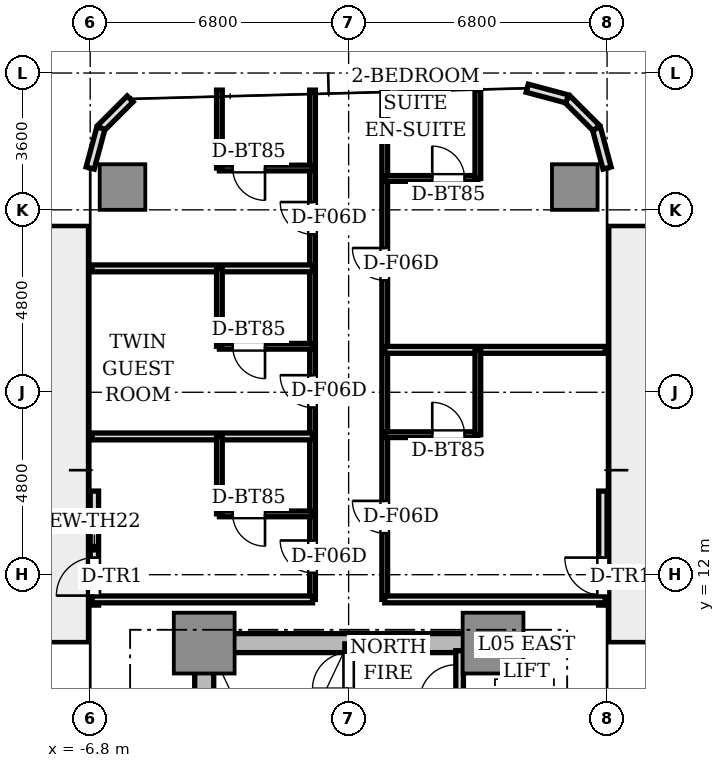
"""IFC4 building model, lengths in metres.
Left out: names, types, materials, properties, quantities, classifications, styles, units other than length and angle.
Written with IfcOpenShell. Run it as: python <this file> out.ifc"""

import sys

from ifc_helpers import new_model, si_unit, direction, frame, frame_2d, origin, origin_2d, place, context, subcontext, project, spatial, rectangle, extrude, source, transform, mapped, element, fill, save


model = new_model("IFC4")
c1 = context("Model", 3, precision=1e-05, world=origin(), true_north=direction((0.0, 1.0)))
c2 = subcontext(c1, "Body", "Model", "MODEL_VIEW")
j1 = project(units=[si_unit("LENGTHUNIT", "METRE"), si_unit("PLANEANGLEUNIT", "RADIAN")], contexts=[c1])
p1 = place(None, origin())
s1 = spatial("IfcSite", under=j1, at=p1, CompositionType="ELEMENT")
p2 = place(p1, origin())
s2 = spatial("IfcBuilding", under=s1, at=p2, CompositionType="ELEMENT")
p3 = place(p2, frame((0.0, 0.0, 23.1)))
s3 = spatial("IfcBuildingStorey", under=s2, at=p3, CompositionType="ELEMENT", Elevation=23.1)
p4 = place(p3, frame((-3.55, 10.2, 0.0), z_axis=(0.0, 0.0, 1.0), x_axis=(1.0, 0.0, 0.0)))
e1 = element("IfcWall", 1, at=p4, inside=s3, PredefinedType="SHEAR", context=c2, shape_type="SweptSolid", body=[
    extrude(rectangle(XDim=7.1, YDim=0.5, at=frame_2d((3.55, 0.0))), origin(), (0.0, 0.0, 1.0), 3.11),
])
p5 = place(p3, frame((-3.8, 2.85, 0.0), z_axis=(0.0, 0.0, 1.0), x_axis=(0.0, 1.0, 0.0)))
e2 = element("IfcWall", 2, at=p5, inside=s3, PredefinedType="SHEAR", context=c2, shape_type="SweptSolid", body=[
    extrude(rectangle(XDim=6.9, YDim=0.5, at=frame_2d((3.45, 0.0))), origin(), (0.0, 0.0, 1.0), 3.11),
])
m1 = source(origin(), c2, "Body", "SweptSolid", [
    extrude(rectangle(XDim=1.6, YDim=1.6, at=origin_2d()), origin(), (0.0, 0.0, 1.0), 3.11),
])
for number, where, z_axis, x_axis in (
    (3, (-3.8, 10.2, 0.0), (0.0, 0.0, 1.0), (1.0, 0.0, 0.0)),
    (4, (3.8, 10.2, 0.0), (0.0, 0.0, 1.0), (1.0, 0.0, 0.0)),
):
    element("IfcColumn", number, at=place(p3, frame(where, z_axis=z_axis, x_axis=x_axis)), inside=s3, PredefinedType="COLUMN", context=c2, shape_type="MappedRepresentation", body=[
        mapped(m1, transform((0.0, 0.0, 0.0), scale=1.0)),
    ])
m2 = source(origin(), c2, "Body", "SweptSolid", [
    extrude(rectangle(XDim=1.2, YDim=1.2, at=origin_2d()), origin(), (0.0, 0.0, 1.0), 3.11),
])
for number, where, z_axis, x_axis in (
    (5, (5.95, 22.2, 0.0), (0.0, 0.0, 1.0), (1.0, 0.0, 0.0)),
    (6, (-5.95, 22.2, 0.0), (0.0, 0.0, 1.0), (1.0, 0.0, 0.0)),
):
    element("IfcColumn", number, at=place(p3, frame(where, z_axis=z_axis, x_axis=x_axis)), inside=s3, PredefinedType="COLUMN", context=c2, shape_type="MappedRepresentation", body=[
        mapped(m2, transform((0.0, 0.0, 0.0), scale=1.0)),
    ])
p6 = place(p3, frame((-6.69, 11.2, 0.0), z_axis=(0.0, 0.0, 1.0), x_axis=(0.0, 1.0, 0.0)))
e7 = element("IfcWall", 7, at=p6, inside=s3, PredefinedType="STANDARD", context=c2, shape_type="SweptSolid", body=[
    extrude(rectangle(XDim=3.0, YDim=0.22, at=frame_2d((1.5, 0.0))), origin(), (0.0, 0.0, 1.0), 3.11),
])
p7 = place(p6, frame((0.25, 0.0, 0.0)))
e8 = element("IfcOpeningElement", 8, at=p7, cuts=e7, PredefinedType="OPENING", context=c2, shape_type="SweptSolid", body=[
    extrude(rectangle(XDim=1.0, YDim=2.2, at=frame_2d((0.5, 1.1))), frame((0.0, 0.12, 0.0), z_axis=(0.0, -1.0, 0.0), x_axis=(1.0, 0.0, 0.0)), (0.0, 0.0, 1.0), 0.24),
])
p8 = place(p3, frame((6.69, 11.2, 0.0), z_axis=(0.0, 0.0, 1.0), x_axis=(0.0, 1.0, 0.0)))
e9 = element("IfcWall", 9, at=p8, inside=s3, PredefinedType="STANDARD", context=c2, shape_type="SweptSolid", body=[
    extrude(rectangle(XDim=3.0, YDim=0.22, at=frame_2d((1.5, 0.0))), origin(), (0.0, 0.0, 1.0), 3.11),
])
p9 = place(p8, frame((0.25, 0.0, 0.0)))
e10 = element("IfcOpeningElement", 10, at=p9, cuts=e9, PredefinedType="OPENING", context=c2, shape_type="SweptSolid", body=[
    extrude(rectangle(XDim=1.0, YDim=2.2, at=frame_2d((0.5, 1.1))), frame((0.0, 0.12, 0.0), z_axis=(0.0, -1.0, 0.0), x_axis=(1.0, 0.0, 0.0)), (0.0, 0.0, 1.0), 0.24),
])
for number, where, z_axis, x_axis in (
    (11, (6.8, 22.7, 0.0), (0.0, 0.0, 1.0), (-0.259, 0.966, 0.0)),
    (12, (6.519, 23.75, 0.0), (0.0, 0.0, 1.0), (-0.707, 0.707, 0.0)),
    (13, (5.75, 24.519, 0.0), (0.0, 0.0, 1.0), (-0.966, 0.259, 0.0)),
    (14, (-5.75, 24.519, 0.0), (0.0, 0.0, 1.0), (-0.707, -0.707, 0.0)),
    (15, (-6.519, 23.75, 0.0), (0.0, 0.0, 1.0), (-0.259, -0.966, 0.0)),
):
    element("IfcWall", number, at=place(p3, frame(where, z_axis=z_axis, x_axis=x_axis)), inside=s3, PredefinedType="STANDARD", context=c2, shape_type="SweptSolid", body=[
        extrude(rectangle(XDim=1.087, YDim=0.22, at=frame_2d((0.543, 0.0))), origin(), (0.0, 0.0, 1.0), 3.11),
    ])
p10 = place(p3, frame((0.0, 2.5, 0.0), z_axis=(0.0, 0.0, 1.0), x_axis=(0.0, 1.0, 0.0)))
e16 = element("IfcWall", 16, at=p10, inside=s3, PredefinedType="SOLIDWALL", context=c2, shape_type="SweptSolid", body=[
    extrude(rectangle(XDim=7.68, YDim=0.2, at=frame_2d((3.84, 0.0))), origin(), (0.0, 0.0, 1.0), 3.11),
])
p11 = place(p10, frame((6.5, 0.0, 0.0)))
e17 = element("IfcOpeningElement", 17, at=p11, cuts=e16, PredefinedType="OPENING", context=c2, shape_type="SweptSolid", body=[
    extrude(rectangle(XDim=0.95, YDim=2.15, at=frame_2d((0.475, 1.075))), frame((0.0, 0.11, 0.0), z_axis=(0.0, -1.0, 0.0), x_axis=(1.0, 0.0, 0.0)), (0.0, 0.0, 1.0), 0.22),
])
p12 = place(p3, frame((2.92, 8.68, 0.0), z_axis=(0.0, 0.0, 1.0), x_axis=(0.0, 1.0, 0.0)))
e18 = element("IfcWall", 18, at=p12, inside=s3, PredefinedType="SOLIDWALL", context=c2, shape_type="SweptSolid", body=[
    extrude(rectangle(XDim=1.32, YDim=0.2, at=frame_2d((0.66, 0.0))), origin(), (0.0, 0.0, 1.0), 2.66),
])
p13 = place(p3, frame((-0.95, 11.35, 0.0), z_axis=(0.0, 0.0, 1.0), x_axis=(0.0, 1.0, 0.0)))
e19 = element("IfcWall", 19, at=p13, inside=s3, PredefinedType="PARTITIONING", context=c2, shape_type="SweptSolid", body=[
    extrude(rectangle(XDim=13.4, YDim=0.15, at=frame_2d((6.7, 0.0))), origin(), (0.0, 0.0, 1.0), 2.66),
])
p14 = place(p13, frame((0.7, 0.0, 0.0)))
e20 = element("IfcOpeningElement", 20, at=p14, cuts=e19, PredefinedType="OPENING", context=c2, shape_type="SweptSolid", body=[
    extrude(rectangle(XDim=0.85, YDim=2.1, at=frame_2d((0.425, 1.05))), frame((0.0, 0.085, 0.0), z_axis=(0.0, -1.0, 0.0), x_axis=(1.0, 0.0, 0.0)), (0.0, 0.0, 1.0), 0.17),
])
p15 = place(p13, frame((5.049, 0.0, 0.0)))
e21 = element("IfcOpeningElement", 21, at=p15, cuts=e19, PredefinedType="OPENING", context=c2, shape_type="SweptSolid", body=[
    extrude(rectangle(XDim=0.85, YDim=2.1, at=frame_2d((0.425, 1.05))), frame((0.0, 0.085, 0.0), z_axis=(0.0, -1.0, 0.0), x_axis=(1.0, 0.0, 0.0)), (0.0, 0.0, 1.0), 0.17),
])
p16 = place(p13, frame((9.605, 0.0, 0.0)))
e22 = element("IfcOpeningElement", 22, at=p16, cuts=e19, PredefinedType="OPENING", context=c2, shape_type="SweptSolid", body=[
    extrude(rectangle(XDim=0.85, YDim=2.1, at=frame_2d((0.425, 1.05))), frame((0.0, 0.085, 0.0), z_axis=(0.0, -1.0, 0.0), x_axis=(1.0, 0.0, 0.0)), (0.0, 0.0, 1.0), 0.17),
])
p17 = place(p3, frame((0.95, 11.35, 0.0), z_axis=(0.0, 0.0, 1.0), x_axis=(0.0, 1.0, 0.0)))
e23 = element("IfcWall", 23, at=p17, inside=s3, PredefinedType="PARTITIONING", context=c2, shape_type="SweptSolid", body=[
    extrude(rectangle(XDim=13.4, YDim=0.15, at=frame_2d((6.7, 0.0))), origin(), (0.0, 0.0, 1.0), 2.66),
])
p18 = place(p17, frame((1.742, 0.0, 0.0)))
e24 = element("IfcOpeningElement", 24, at=p18, cuts=e23, PredefinedType="OPENING", context=c2, shape_type="SweptSolid", body=[
    extrude(rectangle(XDim=0.85, YDim=2.1, at=frame_2d((0.425, 1.05))), frame((0.0, 0.085, 0.0), z_axis=(0.0, -1.0, 0.0), x_axis=(1.0, 0.0, 0.0)), (0.0, 0.0, 1.0), 0.17),
])
p19 = place(p17, frame((8.396, 0.0, 0.0)))
e25 = element("IfcOpeningElement", 25, at=p19, cuts=e23, PredefinedType="OPENING", context=c2, shape_type="SweptSolid", body=[
    extrude(rectangle(XDim=0.85, YDim=2.1, at=frame_2d((0.425, 1.05))), frame((0.0, 0.085, 0.0), z_axis=(0.0, -1.0, 0.0), x_axis=(1.0, 0.0, 0.0)), (0.0, 0.0, 1.0), 0.17),
])
for number, where, z_axis, x_axis in (
    (26, (-0.95, 11.35, 0.0), (0.0, 0.0, 1.0), (-1.0, 0.0, 0.0)),
    (27, (6.75, 11.35, 0.0), (0.0, 0.0, 1.0), (-1.0, 0.0, 0.0)),
    (28, (-0.95, 15.638, 0.0), (0.0, 0.0, 1.0), (-1.0, 0.0, 0.0)),
):
    element("IfcWall", number, at=place(p3, frame(where, z_axis=z_axis, x_axis=x_axis)), inside=s3, PredefinedType="PARTITIONING", context=c2, shape_type="SweptSolid", body=[
        extrude(rectangle(XDim=5.8, YDim=0.18, at=frame_2d((2.9, 0.0))), origin(), (0.0, 0.0, 1.0), 2.66),
    ])
p20 = place(p3, frame((-0.95, 13.6, 0.0), z_axis=(0.0, 0.0, 1.0), x_axis=(-1.0, 0.0, 0.0)))
e29 = element("IfcWall", 29, at=p20, inside=s3, PredefinedType="PARTITIONING", context=c2, shape_type="SweptSolid", body=[
    extrude(rectangle(XDim=2.45, YDim=0.15, at=frame_2d((1.225, 0.0))), origin(), (0.0, 0.0, 1.0), 2.66),
])
p21 = place(p20, frame((1.25, 0.0, 0.0)))
e30 = element("IfcOpeningElement", 30, at=p21, cuts=e29, PredefinedType="OPENING", context=c2, shape_type="SweptSolid", body=[
    extrude(rectangle(XDim=0.85, YDim=2.1, at=frame_2d((0.425, 1.05))), frame((0.0, 0.085, 0.0), z_axis=(0.0, -1.0, 0.0), x_axis=(1.0, 0.0, 0.0)), (0.0, 0.0, 1.0), 0.17),
])
p22 = place(p3, frame((-3.4, 13.6, 0.0), z_axis=(0.0, 0.0, 1.0), x_axis=(0.0, 1.0, 0.0)))
e31 = element("IfcWall", 31, at=p22, inside=s3, PredefinedType="PARTITIONING", context=c2, shape_type="SweptSolid", body=[
    extrude(rectangle(XDim=2.038, YDim=0.15, at=frame_2d((1.019, 0.0))), origin(), (0.0, 0.0, 1.0), 2.66),
])
p23 = place(p3, frame((-0.95, 20.06, 0.0), z_axis=(0.0, 0.0, 1.0), x_axis=(-1.0, 0.0, 0.0)))
e32 = element("IfcWall", 32, at=p23, inside=s3, PredefinedType="PARTITIONING", context=c2, shape_type="SweptSolid", body=[
    extrude(rectangle(XDim=5.8, YDim=0.18, at=frame_2d((2.9, 0.0))), origin(), (0.0, 0.0, 1.0), 2.66),
])
p24 = place(p3, frame((-0.95, 18.01, 0.0), z_axis=(0.0, 0.0, 1.0), x_axis=(-1.0, 0.0, 0.0)))
e33 = element("IfcWall", 33, at=p24, inside=s3, PredefinedType="PARTITIONING", context=c2, shape_type="SweptSolid", body=[
    extrude(rectangle(XDim=2.45, YDim=0.15, at=frame_2d((1.225, 0.0))), origin(), (0.0, 0.0, 1.0), 2.66),
])
p25 = place(p24, frame((1.25, 0.0, 0.0)))
e34 = element("IfcOpeningElement", 34, at=p25, cuts=e33, PredefinedType="OPENING", context=c2, shape_type="SweptSolid", body=[
    extrude(rectangle(XDim=0.85, YDim=2.1, at=frame_2d((0.425, 1.05))), frame((0.0, 0.085, 0.0), z_axis=(0.0, -1.0, 0.0), x_axis=(1.0, 0.0, 0.0)), (0.0, 0.0, 1.0), 0.17),
])
p26 = place(p3, frame((-3.4, 18.01, 0.0), z_axis=(0.0, 0.0, 1.0), x_axis=(0.0, 1.0, 0.0)))
e35 = element("IfcWall", 35, at=p26, inside=s3, PredefinedType="PARTITIONING", context=c2, shape_type="SweptSolid", body=[
    extrude(rectangle(XDim=2.05, YDim=0.15, at=frame_2d((1.025, 0.0))), origin(), (0.0, 0.0, 1.0), 2.66),
])
p27 = place(p3, frame((-0.95, 22.7, 0.0), z_axis=(0.0, 0.0, 1.0), x_axis=(-1.0, 0.0, 0.0)))
e36 = element("IfcWall", 36, at=p27, inside=s3, PredefinedType="PARTITIONING", context=c2, shape_type="SweptSolid", body=[
    extrude(rectangle(XDim=2.45, YDim=0.15, at=frame_2d((1.225, 0.0))), origin(), (0.0, 0.0, 1.0), 2.66),
])
p28 = place(p27, frame((1.25, 0.0, 0.0)))
e37 = element("IfcOpeningElement", 37, at=p28, cuts=e36, PredefinedType="OPENING", context=c2, shape_type="SweptSolid", body=[
    extrude(rectangle(XDim=0.85, YDim=2.1, at=frame_2d((0.425, 1.05))), frame((0.0, 0.085, 0.0), z_axis=(0.0, -1.0, 0.0), x_axis=(1.0, 0.0, 0.0)), (0.0, 0.0, 1.0), 0.17),
])
p29 = place(p3, frame((-3.4, 22.7, 0.0), z_axis=(0.0, 0.0, 1.0), x_axis=(0.0, 1.0, 0.0)))
e38 = element("IfcWall", 38, at=p29, inside=s3, PredefinedType="PARTITIONING", context=c2, shape_type="SweptSolid", body=[
    extrude(rectangle(XDim=2.05, YDim=0.15, at=frame_2d((1.025, 0.0))), origin(), (0.0, 0.0, 1.0), 2.66),
])
p30 = place(p3, frame((0.95, 17.916, 0.0), z_axis=(0.0, 0.0, 1.0), x_axis=(1.0, 0.0, 0.0)))
e39 = element("IfcWall", 39, at=p30, inside=s3, PredefinedType="PARTITIONING", context=c2, shape_type="SweptSolid", body=[
    extrude(rectangle(XDim=5.8, YDim=0.18, at=frame_2d((2.9, 0.0))), origin(), (0.0, 0.0, 1.0), 2.66),
])
p31 = place(p3, frame((0.95, 15.684, 0.0), z_axis=(0.0, 0.0, 1.0), x_axis=(1.0, 0.0, 0.0)))
e40 = element("IfcWall", 40, at=p31, inside=s3, PredefinedType="PARTITIONING", context=c2, shape_type="SweptSolid", body=[
    extrude(rectangle(XDim=2.45, YDim=0.15, at=frame_2d((1.225, 0.0))), origin(), (0.0, 0.0, 1.0), 2.66),
])
p32 = place(p31, frame((1.25, 0.0, 0.0)))
e41 = element("IfcOpeningElement", 41, at=p32, cuts=e40, PredefinedType="OPENING", context=c2, shape_type="SweptSolid", body=[
    extrude(rectangle(XDim=0.85, YDim=2.1, at=frame_2d((0.425, 1.05))), frame((0.0, 0.085, 0.0), z_axis=(0.0, -1.0, 0.0), x_axis=(1.0, 0.0, 0.0)), (0.0, 0.0, 1.0), 0.17),
])
p33 = place(p3, frame((3.4, 15.684, 0.0), z_axis=(0.0, 0.0, 1.0), x_axis=(0.0, 1.0, 0.0)))
e42 = element("IfcWall", 42, at=p33, inside=s3, PredefinedType="PARTITIONING", context=c2, shape_type="SweptSolid", body=[
    extrude(rectangle(XDim=2.232, YDim=0.15, at=frame_2d((1.116, 0.0))), origin(), (0.0, 0.0, 1.0), 2.66),
])
p34 = place(p3, frame((0.95, 22.426, 0.0), z_axis=(0.0, 0.0, 1.0), x_axis=(1.0, 0.0, 0.0)))
e43 = element("IfcWall", 43, at=p34, inside=s3, PredefinedType="PARTITIONING", context=c2, shape_type="SweptSolid", body=[
    extrude(rectangle(XDim=2.45, YDim=0.15, at=frame_2d((1.225, 0.0))), origin(), (0.0, 0.0, 1.0), 2.58),
])
p35 = place(p34, frame((1.25, 0.0, 0.0)))
e44 = element("IfcOpeningElement", 44, at=p35, cuts=e43, PredefinedType="OPENING", context=c2, shape_type="SweptSolid", body=[
    extrude(rectangle(XDim=0.85, YDim=2.1, at=frame_2d((0.425, 1.05))), frame((0.0, 0.085, 0.0), z_axis=(0.0, -1.0, 0.0), x_axis=(1.0, 0.0, 0.0)), (0.0, 0.0, 1.0), 0.17),
])
p36 = place(p3, frame((3.4, 22.426, 0.0), z_axis=(0.0, 0.0, 1.0), x_axis=(0.0, 1.0, 0.0)))
e45 = element("IfcWall", 45, at=p36, inside=s3, PredefinedType="PARTITIONING", context=c2, shape_type="SweptSolid", body=[
    extrude(rectangle(XDim=2.324, YDim=0.15, at=frame_2d((1.162, 0.0))), origin(), (0.0, 0.0, 1.0), 2.66),
])
m3 = source(origin(), c2, "Body", "SweptSolid", [
    extrude(rectangle(XDim=1.0, YDim=0.05, at=origin_2d()), origin(), (0.0, 0.0, 1.0), 2.2),
])
p37 = place(p7, frame((0.5, 0.0, 0.0)))
e46 = element("IfcDoor", 46, at=p37, inside=s3, OperationType="SINGLE_SWING_LEFT", PredefinedType="DOOR", context=c2, shape_type="MappedRepresentation", body=[
    mapped(m3, transform((0.0, 0.0, 0.0), scale=1.0)),
])
fill(e8, e46)
p38 = place(p9, frame((0.5, 0.0, 0.0)))
e47 = element("IfcDoor", 47, at=p38, inside=s3, OperationType="SINGLE_SWING_RIGHT", PredefinedType="DOOR", context=c2, shape_type="MappedRepresentation", body=[
    mapped(m3, transform((0.0, 0.0, 0.0), scale=1.0)),
])
fill(e10, e47)
m4 = source(origin(), c2, "Body", "SweptSolid", [
    extrude(rectangle(XDim=0.95, YDim=0.05, at=origin_2d()), origin(), (0.0, 0.0, 1.0), 2.15),
])
p39 = place(p11, frame((0.475, 0.0, 0.0)))
e48 = element("IfcDoor", 48, at=p39, inside=s3, OperationType="SINGLE_SWING_LEFT", PredefinedType="DOOR", context=c2, shape_type="MappedRepresentation", body=[
    mapped(m4, transform((0.0, 0.0, 0.0), scale=1.0)),
])
fill(e17, e48)
m5 = source(origin(), c2, "Body", "SweptSolid", [
    extrude(rectangle(XDim=0.85, YDim=0.05, at=origin_2d()), origin(), (0.0, 0.0, 1.0), 2.1),
])
p40 = place(p21, frame((0.425, 0.0, 0.0)))
e49 = element("IfcDoor", 49, at=p40, inside=s3, OperationType="SINGLE_SWING_LEFT", PredefinedType="DOOR", context=c2, shape_type="MappedRepresentation", body=[
    mapped(m5, transform((0.0, 0.0, 0.0), scale=1.0)),
])
fill(e30, e49)
p41 = place(p14, frame((0.425, 0.0, 0.0)))
e50 = element("IfcDoor", 50, at=p41, inside=s3, OperationType="SINGLE_SWING_RIGHT", PredefinedType="DOOR", context=c2, shape_type="MappedRepresentation", body=[
    mapped(m5, transform((0.0, 0.0, 0.0), scale=1.0)),
])
fill(e20, e50)
p42 = place(p25, frame((0.425, 0.0, 0.0)))
e51 = element("IfcDoor", 51, at=p42, inside=s3, OperationType="SINGLE_SWING_LEFT", PredefinedType="DOOR", context=c2, shape_type="MappedRepresentation", body=[
    mapped(m5, transform((0.0, 0.0, 0.0), scale=1.0)),
])
fill(e34, e51)
p43 = place(p15, frame((0.425, 0.0, 0.0)))
e52 = element("IfcDoor", 52, at=p43, inside=s3, OperationType="SINGLE_SWING_RIGHT", PredefinedType="DOOR", context=c2, shape_type="MappedRepresentation", body=[
    mapped(m5, transform((0.0, 0.0, 0.0), scale=1.0)),
])
fill(e21, e52)
p44 = place(p28, frame((0.425, 0.0, 0.0)))
e53 = element("IfcDoor", 53, at=p44, inside=s3, OperationType="SINGLE_SWING_LEFT", PredefinedType="DOOR", context=c2, shape_type="MappedRepresentation", body=[
    mapped(m5, transform((0.0, 0.0, 0.0), scale=1.0)),
])
fill(e37, e53)
p45 = place(p16, frame((0.425, 0.0, 0.0)))
e54 = element("IfcDoor", 54, at=p45, inside=s3, OperationType="SINGLE_SWING_RIGHT", PredefinedType="DOOR", context=c2, shape_type="MappedRepresentation", body=[
    mapped(m5, transform((0.0, 0.0, 0.0), scale=1.0)),
])
fill(e22, e54)
p46 = place(p32, frame((0.425, 0.0, 0.0)))
e55 = element("IfcDoor", 55, at=p46, inside=s3, OperationType="SINGLE_SWING_LEFT", PredefinedType="DOOR", context=c2, shape_type="MappedRepresentation", body=[
    mapped(m5, transform((0.0, 0.0, 0.0), scale=1.0)),
])
fill(e41, e55)
p47 = place(p18, frame((0.425, 0.0, 0.0)))
e56 = element("IfcDoor", 56, at=p47, inside=s3, OperationType="SINGLE_SWING_RIGHT", PredefinedType="DOOR", context=c2, shape_type="MappedRepresentation", body=[
    mapped(m5, transform((0.0, 0.0, 0.0), scale=1.0)),
])
fill(e24, e56)
p48 = place(p35, frame((0.425, 0.0, 0.0)))
e57 = element("IfcDoor", 57, at=p48, inside=s3, OperationType="SINGLE_SWING_LEFT", PredefinedType="DOOR", context=c2, shape_type="MappedRepresentation", body=[
    mapped(m5, transform((0.0, 0.0, 0.0), scale=1.0)),
])
fill(e44, e57)
p49 = place(p19, frame((0.425, 0.0, 0.0)))
e58 = element("IfcDoor", 58, at=p49, inside=s3, OperationType="SINGLE_SWING_RIGHT", PredefinedType="DOOR", context=c2, shape_type="MappedRepresentation", body=[
    mapped(m5, transform((0.0, 0.0, 0.0), scale=1.0)),
])
fill(e25, e58)
save(model, sys.argv[1])
